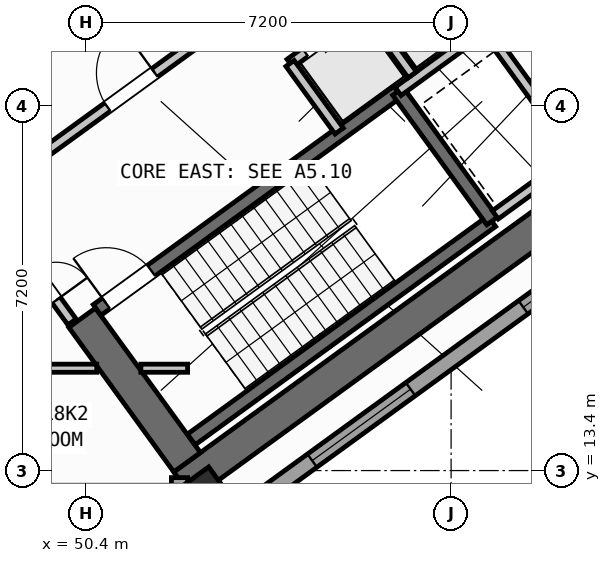
"""IFC4 building model, lengths in metres.
Left out: names, types, materials, properties, quantities, classifications, styles, units other than length and angle.
Written with IfcOpenShell. Run it as: python <this file> out.ifc"""

import sys

from ifc_helpers import new_model, si_unit, direction, frame, frame_2d, origin, origin_2d, place, context, subcontext, project, spatial, rectangle, hollow_rectangle, extrude, source, transform, mapped, element, fill, save


model = new_model("IFC4")
c1 = context("Model", 3, precision=1e-05, world=origin(), true_north=direction((0.0, 1.0)))
c2 = subcontext(c1, "Body", "Model", "MODEL_VIEW")
j1 = project(units=[si_unit("LENGTHUNIT", "METRE"), si_unit("PLANEANGLEUNIT", "RADIAN")], contexts=[c1])
p1 = place(None, origin())
s1 = spatial("IfcSite", under=j1, at=p1, CompositionType="ELEMENT")
p2 = place(p1, origin())
s2 = spatial("IfcBuilding", under=s1, at=p2, CompositionType="ELEMENT")
p3 = place(p2, frame((0.0, 0.0, 71.7)))
s3 = spatial("IfcBuildingStorey", under=s2, at=p3, CompositionType="ELEMENT", Elevation=71.7)
p4 = place(p3, frame((52.318, 13.11, 0.0), z_axis=(0.0, 0.0, 1.0), x_axis=(0.809019445368, 0.587781878776, 0.0)))
e1 = element("IfcWall", 1, at=p4, inside=s3, PredefinedType="SHEAR", context=c2, shape_type="SweptSolid", body=[
    extrude(rectangle(XDim=12.44, YDim=0.65, at=frame_2d((6.22, 0.0))), origin(), (0.0, 0.0, 1.0), 4.52),
])
p5 = place(p3, frame((52.39, 13.564, 0.0), z_axis=(0.0, 0.0, 1.0), x_axis=(-0.58779688989, 0.809008539037, 0.0)))
e2 = element("IfcWall", 2, at=p5, inside=s3, PredefinedType="SHEAR", context=c2, shape_type="SweptSolid", body=[
    extrude(rectangle(XDim=3.525, YDim=0.65, at=frame_2d((1.763, 0.0))), origin(), (0.0, 0.0, 1.0), 4.52),
])
m1 = source(origin(), c2, "Body", "SweptSolid", [
    extrude(hollow_rectangle(XDim=1.0, YDim=1.0, WallThickness=0.04, at=origin_2d()), origin(), (0.0, 0.0, 1.0), 4.8),
])
p6 = place(p3, frame((52.705, 12.773, 0.0), z_axis=(0.0, 0.0, 1.0), x_axis=(0.809016994375, 0.587785252292, 0.0)))
e3 = element("IfcColumn", 3, at=p6, inside=s3, PredefinedType="COLUMN", context=c2, shape_type="MappedRepresentation", body=[
    mapped(m1, transform((0.0, 0.0, 0.0), scale=1.0)),
])
p7 = place(p3, frame((67.454, 22.747, 0.0), z_axis=(0.0, 0.0, 1.0), x_axis=(-0.809021120468, -0.587779573171, 0.0)))
e4 = element("IfcWall", 4, at=p7, inside=s3, PredefinedType="STANDARD", context=c2, shape_type="SweptSolid", body=[
    extrude(rectangle(XDim=17.588, YDim=0.32, at=frame_2d((8.794, 0.0))), origin(), (0.0, 0.0, 1.0), 4.52),
])
p8 = place(p7, frame((1.624, 0.0, 0.0)))
e5 = element("IfcOpeningElement", 5, at=p8, cuts=e4, PredefinedType="OPENING", context=c2, shape_type="SweptSolid", body=[
    extrude(rectangle(XDim=1.05, YDim=2.15, at=frame_2d((0.525, 1.075))), frame((0.0, 0.17, 0.0), z_axis=(0.0, -1.0, 0.0), x_axis=(1.0, 0.0, 0.0)), (0.0, 0.0, 1.0), 0.34),
])
p9 = place(p7, frame((8.019, 0.0, 0.75)))
e6 = element("IfcOpeningElement", 6, at=p9, cuts=e4, PredefinedType="OPENING", context=c2, shape_type="SweptSolid", body=[
    extrude(rectangle(XDim=2.4, YDim=1.6, at=frame_2d((1.2, 0.8))), frame((0.0, 0.17, 0.0), z_axis=(0.0, -1.0, 0.0), x_axis=(1.0, 0.0, 0.0)), (0.0, 0.0, 1.0), 0.34),
])
p10 = place(p7, frame((13.169, 0.0, 0.75)))
e7 = element("IfcOpeningElement", 7, at=p10, cuts=e4, PredefinedType="OPENING", context=c2, shape_type="SweptSolid", body=[
    extrude(rectangle(XDim=2.4, YDim=1.6, at=frame_2d((1.2, 0.8))), frame((0.0, 0.17, 0.0), z_axis=(0.0, -1.0, 0.0), x_axis=(1.0, 0.0, 0.0)), (0.0, 0.0, 1.0), 0.34),
])
p11 = place(p3, frame((52.24, 13.261, 0.0), z_axis=(0.0, 0.0, 1.0), x_axis=(0.0, -1.0, 0.0)))
e8 = element("IfcWall", 8, at=p11, inside=s3, PredefinedType="STANDARD", context=c2, shape_type="SweptSolid", body=[
    extrude(rectangle(XDim=9.795, YDim=0.32, at=frame_2d((4.897, 0.0))), origin(), (0.0, 0.0, 1.0), 4.52),
])
p12 = place(p11, frame((2.049, 0.0, 0.75)))
e9 = element("IfcOpeningElement", 9, at=p12, cuts=e8, PredefinedType="OPENING", context=c2, shape_type="SweptSolid", body=[
    extrude(rectangle(XDim=2.4, YDim=1.6, at=frame_2d((1.2, 0.8))), frame((0.0, 0.17, 0.0), z_axis=(0.0, -1.0, 0.0), x_axis=(1.0, 0.0, 0.0)), (0.0, 0.0, 1.0), 0.34),
])
p13 = place(p11, frame((6.88, 0.0, 0.85)))
e10 = element("IfcOpeningElement", 10, at=p13, cuts=e8, PredefinedType="OPENING", context=c2, shape_type="SweptSolid", body=[
    extrude(rectangle(XDim=1.8, YDim=1.5, at=frame_2d((0.9, 0.75))), frame((0.0, 0.17, 0.0), z_axis=(0.0, -1.0, 0.0), x_axis=(1.0, 0.0, 0.0)), (0.0, 0.0, 1.0), 0.34),
])
p14 = place(p3, frame((52.472, 14.013, 0.0), z_axis=(0.0, 0.0, 1.0), x_axis=(0.809028366311, 0.587769599847, 0.0)))
e11 = element("IfcWall", 11, at=p14, inside=s3, PredefinedType="SHEAR", context=c2, shape_type="SweptSolid", body=[
    extrude(rectangle(XDim=7.33, YDim=0.26, at=frame_2d((3.665, 0.0))), origin(), (0.0, 0.0, 1.0), 4.52),
])
p15 = place(p3, frame((50.615, 16.57, 0.0), z_axis=(0.0, 0.0, 1.0), x_axis=(0.809028366311, 0.587769599847, 0.0)))
e12 = element("IfcWall", 12, at=p15, inside=s3, PredefinedType="SHEAR", context=c2, shape_type="SweptSolid", body=[
    extrude(rectangle(XDim=7.33, YDim=0.26, at=frame_2d((3.665, 0.0))), origin(), (0.0, 0.0, 1.0), 4.52),
])
p16 = place(p15, frame((0.22, 0.0, 0.0)))
e13 = element("IfcOpeningElement", 13, at=p16, cuts=e12, PredefinedType="OPENING", context=c2, shape_type="SweptSolid", body=[
    extrude(rectangle(XDim=1.1, YDim=2.1, at=frame_2d((0.55, 1.05))), frame((0.0, 0.14, 0.0), z_axis=(0.0, -1.0, 0.0), x_axis=(1.0, 0.0, 0.0)), (0.0, 0.0, 1.0), 0.28),
])
p17 = place(p3, frame((58.41, 18.327, 0.0), z_axis=(0.0, 0.0, 1.0), x_axis=(-0.58776738483, 0.809029975545, 0.0)))
e14 = element("IfcWall", 14, at=p17, inside=s3, PredefinedType="SHEAR", context=c2, shape_type="SweptSolid", body=[
    extrude(rectangle(XDim=3.16, YDim=0.26, at=frame_2d((1.58, 0.0))), origin(), (0.0, 0.0, 1.0), 4.52),
])
p18 = place(p3, frame((47.106, 21.437, 0.0), z_axis=(0.0, 0.0, 1.0), x_axis=(0.809012514015, 0.58779141893, 0.0)))
e15 = element("IfcWall", 15, at=p18, inside=s3, PredefinedType="STANDARD", context=c2, shape_type="SweptSolid", body=[
    extrude(rectangle(XDim=3.398, YDim=0.2, at=frame_2d((1.699, 0.0))), origin(), (0.0, 0.0, 1.0), 4.51),
])
p19 = place(p18, frame((0.408, 0.0, 0.0)))
e16 = element("IfcOpeningElement", 16, at=p19, cuts=e15, PredefinedType="OPENING", context=c2, shape_type="SweptSolid", body=[
    extrude(rectangle(XDim=1.3, YDim=2.2, at=frame_2d((0.65, 1.1))), frame((0.0, 0.11, 0.0), z_axis=(0.0, -1.0, 0.0), x_axis=(1.0, 0.0, 0.0)), (0.0, 0.0, 1.0), 0.22),
])
p20 = place(p3, frame((48.799, 19.107, 0.0), z_axis=(0.0, 0.0, 1.0), x_axis=(0.809012959416, 0.587790805897, 0.0)))
e17 = element("IfcWall", 17, at=p20, inside=s3, PredefinedType="STANDARD", context=c2, shape_type="SweptSolid", body=[
    extrude(rectangle(XDim=5.718, YDim=0.2, at=frame_2d((2.859, 0.0))), origin(), (0.0, 0.0, 1.0), 4.51),
])
p21 = place(p20, frame((2.498, 0.0, 0.0)))
e18 = element("IfcOpeningElement", 18, at=p21, cuts=e17, PredefinedType="OPENING", context=c2, shape_type="SweptSolid", body=[
    extrude(rectangle(XDim=1.15, YDim=2.1, at=frame_2d((0.575, 1.05))), frame((0.0, 0.11, 0.0), z_axis=(0.0, -1.0, 0.0), x_axis=(1.0, 0.0, 0.0)), (0.0, 0.0, 1.0), 0.22),
])
p22 = place(p3, frame((56.553, 20.884, 0.0), z_axis=(0.0, 0.0, 1.0), x_axis=(0.809035789462, 0.587759382205, 0.0)))
e19 = element("IfcWall", 19, at=p22, inside=s3, PredefinedType="STANDARD", context=c2, shape_type="SweptSolid", body=[
    extrude(rectangle(XDim=3.768, YDim=0.2, at=frame_2d((1.884, 0.0))), origin(), (0.0, 0.0, 1.0), 4.51),
])
p23 = place(p22, frame((2.65, 0.0, 0.0)))
e20 = element("IfcOpeningElement", 20, at=p23, cuts=e19, PredefinedType="OPENING", context=c2, shape_type="SweptSolid", body=[
    extrude(rectangle(XDim=0.86, YDim=2.05, at=frame_2d((0.43, 1.025))), frame((0.0, 0.11, 0.0), z_axis=(0.0, -1.0, 0.0), x_axis=(1.0, 0.0, 0.0)), (0.0, 0.0, 1.0), 0.22),
])
p24 = place(p3, frame((54.421, 21.436, 0.0), z_axis=(0.0, 0.0, 1.0), x_axis=(0.809013710463, 0.587789772183, 0.0)))
e21 = element("IfcWall", 21, at=p24, inside=s3, PredefinedType="STANDARD", context=c2, shape_type="SweptSolid", body=[
    extrude(rectangle(XDim=5.36, YDim=0.2, at=frame_2d((2.68, 0.0))), origin(), (0.0, 0.0, 1.0), 4.51),
])
p25 = place(p24, frame((0.37, 0.0, 0.0)))
e22 = element("IfcOpeningElement", 22, at=p25, cuts=e21, PredefinedType="OPENING", context=c2, shape_type="SweptSolid", body=[
    extrude(rectangle(XDim=1.1, YDim=2.15, at=frame_2d((0.55, 1.075))), frame((0.0, 0.11, 0.0), z_axis=(0.0, -1.0, 0.0), x_axis=(1.0, 0.0, 0.0)), (0.0, 0.0, 1.0), 0.22),
])
p26 = place(p24, frame((2.17, 0.0, 0.0)))
e23 = element("IfcOpeningElement", 23, at=p26, cuts=e21, PredefinedType="OPENING", context=c2, shape_type="SweptSolid", body=[
    extrude(rectangle(XDim=1.1, YDim=2.15, at=frame_2d((0.55, 1.075))), frame((0.0, 0.11, 0.0), z_axis=(0.0, -1.0, 0.0), x_axis=(1.0, 0.0, 0.0)), (0.0, 0.0, 1.0), 0.22),
])
p27 = place(p24, frame((3.97, 0.0, 0.0)))
e24 = element("IfcOpeningElement", 24, at=p27, cuts=e21, PredefinedType="OPENING", context=c2, shape_type="SweptSolid", body=[
    extrude(rectangle(XDim=1.1, YDim=2.15, at=frame_2d((0.55, 1.075))), frame((0.0, 0.11, 0.0), z_axis=(0.0, -1.0, 0.0), x_axis=(1.0, 0.0, 0.0)), (0.0, 0.0, 1.0), 0.22),
])
p28 = place(p3, frame((55.391, 20.102, 0.0), z_axis=(0.0, 0.0, 1.0), x_axis=(-0.58778447739, 0.809017557374, 0.0)))
e25 = element("IfcWall", 25, at=p28, inside=s3, PredefinedType="STANDARD", context=c2, shape_type="SweptSolid", body=[
    extrude(rectangle(XDim=1.65, YDim=0.2, at=frame_2d((0.825, 0.0))), origin(), (0.0, 0.0, 1.0), 4.51),
])
p29 = place(p3, frame((56.834, 21.212, 0.0), z_axis=(0.0, 0.0, 1.0), x_axis=(-0.58776738483, 0.809029975545, 0.0)))
e26 = element("IfcWall", 26, at=p29, inside=s3, PredefinedType="STANDARD", context=c2, shape_type="SweptSolid", body=[
    extrude(rectangle(XDim=1.58, YDim=0.2, at=frame_2d((0.79, 0.0))), origin(), (0.0, 0.0, 1.0), 4.51),
])
p30 = place(p3, frame((60.067, 19.655, 0.0), z_axis=(0.0, 0.0, 1.0), x_axis=(-0.587800520745, 0.809005900975, 0.0)))
e27 = element("IfcWall", 27, at=p30, inside=s3, PredefinedType="STANDARD", context=c2, shape_type="SweptSolid", body=[
    extrude(rectangle(XDim=2.66, YDim=0.2, at=frame_2d((1.33, 0.0))), origin(), (0.0, 0.0, 1.0), 4.51),
])
p31 = place(p3, frame((58.472, 18.447, 0.0), z_axis=(0.0, 0.0, 1.0), x_axis=(0.809022487728, 0.587777691266, 0.0)))
e28 = element("IfcWall", 28, at=p31, inside=s3, PredefinedType="STANDARD", context=c2, shape_type="SweptSolid", body=[
    extrude(rectangle(XDim=3.648, YDim=0.2, at=frame_2d((1.824, 0.0))), origin(), (0.0, 0.0, 1.0), 4.51),
])
p32 = place(p3, frame((35.296, 15.42, 0.0), z_axis=(0.0, 0.0, 1.0), x_axis=(1.0, 0.0, 0.0)))
e29 = element("IfcWall", 29, at=p32, inside=s3, PredefinedType="PARTITIONING", context=c2, shape_type="SweptSolid", body=[
    extrude(rectangle(XDim=15.311, YDim=0.16, at=frame_2d((7.655, 0.0))), origin(), (0.0, 0.0, 1.0), 4.51),
])
p33 = place(p32, frame((0.91, 0.0, 0.0)))
e30 = element("IfcOpeningElement", 30, at=p33, cuts=e29, PredefinedType="OPENING", context=c2, shape_type="SweptSolid", body=[
    extrude(rectangle(XDim=1.0, YDim=2.1, at=frame_2d((0.5, 1.05))), frame((0.0, 0.09, 0.0), z_axis=(0.0, -1.0, 0.0), x_axis=(1.0, 0.0, 0.0)), (0.0, 0.0, 1.0), 0.18),
])
p34 = place(p32, frame((8.74, 0.0, 0.0)))
e31 = element("IfcOpeningElement", 31, at=p34, cuts=e29, PredefinedType="OPENING", context=c2, shape_type="SweptSolid", body=[
    extrude(rectangle(XDim=1.0, YDim=2.1, at=frame_2d((0.5, 1.05))), frame((0.0, 0.09, 0.0), z_axis=(0.0, -1.0, 0.0), x_axis=(1.0, 0.0, 0.0)), (0.0, 0.0, 1.0), 0.18),
])
p35 = place(p3, frame((51.477, 15.42, 0.0), z_axis=(0.0, 0.0, 1.0), x_axis=(1.0, 0.0, 0.0)))
e32 = element("IfcWall", 32, at=p35, inside=s3, PredefinedType="PARTITIONING", context=c2, shape_type="SweptSolid", body=[
    extrude(rectangle(XDim=0.923, YDim=0.16, at=frame_2d((0.461, 0.0))), origin(), (0.0, 0.0, 1.0), 4.51),
])
p36 = place(p3, frame((50.119, 16.333, 0.0), z_axis=(0.0, 0.0, 1.0), x_axis=(-0.587749856981, 0.809042709391, 0.0)))
e33 = element("IfcWall", 33, at=p36, inside=s3, PredefinedType="STANDARD", context=c2, shape_type="SweptSolid", body=[
    extrude(rectangle(XDim=2.96, YDim=0.2, at=frame_2d((1.48, 0.0))), origin(), (0.0, 0.0, 1.0), 4.51),
])
p37 = place(p36, frame((0.53, 0.0, 0.0)))
e34 = element("IfcOpeningElement", 34, at=p37, cuts=e33, PredefinedType="OPENING", context=c2, shape_type="SweptSolid", body=[
    extrude(rectangle(XDim=1.5, YDim=2.15, at=frame_2d((0.75, 1.075))), frame((0.0, 0.11, 0.0), z_axis=(0.0, -1.0, 0.0), x_axis=(1.0, 0.0, 0.0)), (0.0, 0.0, 1.0), 0.22),
])
m2 = source(origin(), c2, "Body", "SweptSolid", [
    extrude(rectangle(XDim=2.4, YDim=1.6, at=frame_2d((1.2, 0.8))), frame((0.0, 0.03, 0.0), z_axis=(0.0, -1.0, 0.0), x_axis=(1.0, 0.0, 0.0)), (0.0, 0.0, 1.0), 0.06),
])
p38 = place(p9, origin())
e35 = element("IfcWindow", 35, at=p38, inside=s3, PartitioningType="SINGLE_PANEL", PredefinedType="WINDOW", context=c2, shape_type="MappedRepresentation", body=[
    mapped(m2, transform((0.0, 0.0, 0.0), scale=1.0)),
])
fill(e6, e35)
p39 = place(p10, origin())
e36 = element("IfcWindow", 36, at=p39, inside=s3, PartitioningType="SINGLE_PANEL", PredefinedType="WINDOW", context=c2, shape_type="MappedRepresentation", body=[
    mapped(m2, transform((0.0, 0.0, 0.0), scale=1.0)),
])
fill(e7, e36)
m3 = source(origin(), c2, "Body", "SweptSolid", [
    extrude(rectangle(XDim=1.1, YDim=2.1, at=frame_2d((0.55, 1.05))), frame((0.0, 0.025, 0.0), z_axis=(0.0, -1.0, 0.0), x_axis=(1.0, 0.0, 0.0)), (0.0, 0.0, 1.0), 0.05),
])
p40 = place(p16, origin())
e37 = element("IfcDoor", 37, at=p40, inside=s3, OperationType="SINGLE_SWING_LEFT", PredefinedType="DOOR", context=c2, shape_type="MappedRepresentation", body=[
    mapped(m3, transform((0.0, 0.0, 0.0), scale=1.0)),
])
fill(e13, e37)
m4 = source(origin(), c2, "Body", "SweptSolid", [
    extrude(rectangle(XDim=1.15, YDim=2.1, at=frame_2d((0.575, 1.05))), frame((0.0, 0.025, 0.0), z_axis=(0.0, -1.0, 0.0), x_axis=(1.0, 0.0, 0.0)), (0.0, 0.0, 1.0), 0.05),
])
p41 = place(p21, origin())
e38 = element("IfcDoor", 38, at=p41, inside=s3, OperationType="SINGLE_SWING_RIGHT", PredefinedType="DOOR", context=c2, shape_type="MappedRepresentation", body=[
    mapped(m4, transform((0.0, 0.0, 0.0), scale=1.0)),
])
fill(e18, e38)
m5 = source(origin(), c2, "Body", "SweptSolid", [
    extrude(rectangle(XDim=1.1, YDim=2.15, at=frame_2d((0.55, 1.075))), frame((0.0, 0.025, 0.0), z_axis=(0.0, -1.0, 0.0), x_axis=(1.0, 0.0, 0.0)), (0.0, 0.0, 1.0), 0.05),
])
p42 = place(p25, origin())
e39 = element("IfcDoor", 39, at=p42, inside=s3, OperationType="DOUBLE_DOOR_SLIDING", PredefinedType="DOOR", context=c2, shape_type="MappedRepresentation", body=[
    mapped(m5, transform((0.0, 0.0, 0.0), scale=1.0)),
])
fill(e22, e39)
m6 = source(origin(), c2, "Body", "SweptSolid", [
    extrude(rectangle(XDim=1.5, YDim=2.15, at=frame_2d((0.75, 1.075))), frame((0.0, 0.025, 0.0), z_axis=(0.0, -1.0, 0.0), x_axis=(1.0, 0.0, 0.0)), (0.0, 0.0, 1.0), 0.05),
])
p43 = place(p37, frame((1.5, 0.0, 0.0), z_axis=(0.0, 0.0, 1.0), x_axis=(-1.0, 0.0, 0.0)))
e40 = element("IfcDoor", 40, at=p43, inside=s3, OperationType="DOUBLE_DOOR_SINGLE_SWING", PredefinedType="DOOR", context=c2, shape_type="MappedRepresentation", body=[
    mapped(m6, transform((0.0, 0.0, 0.0), scale=1.0)),
])
fill(e34, e40)
save(model, sys.argv[1])
